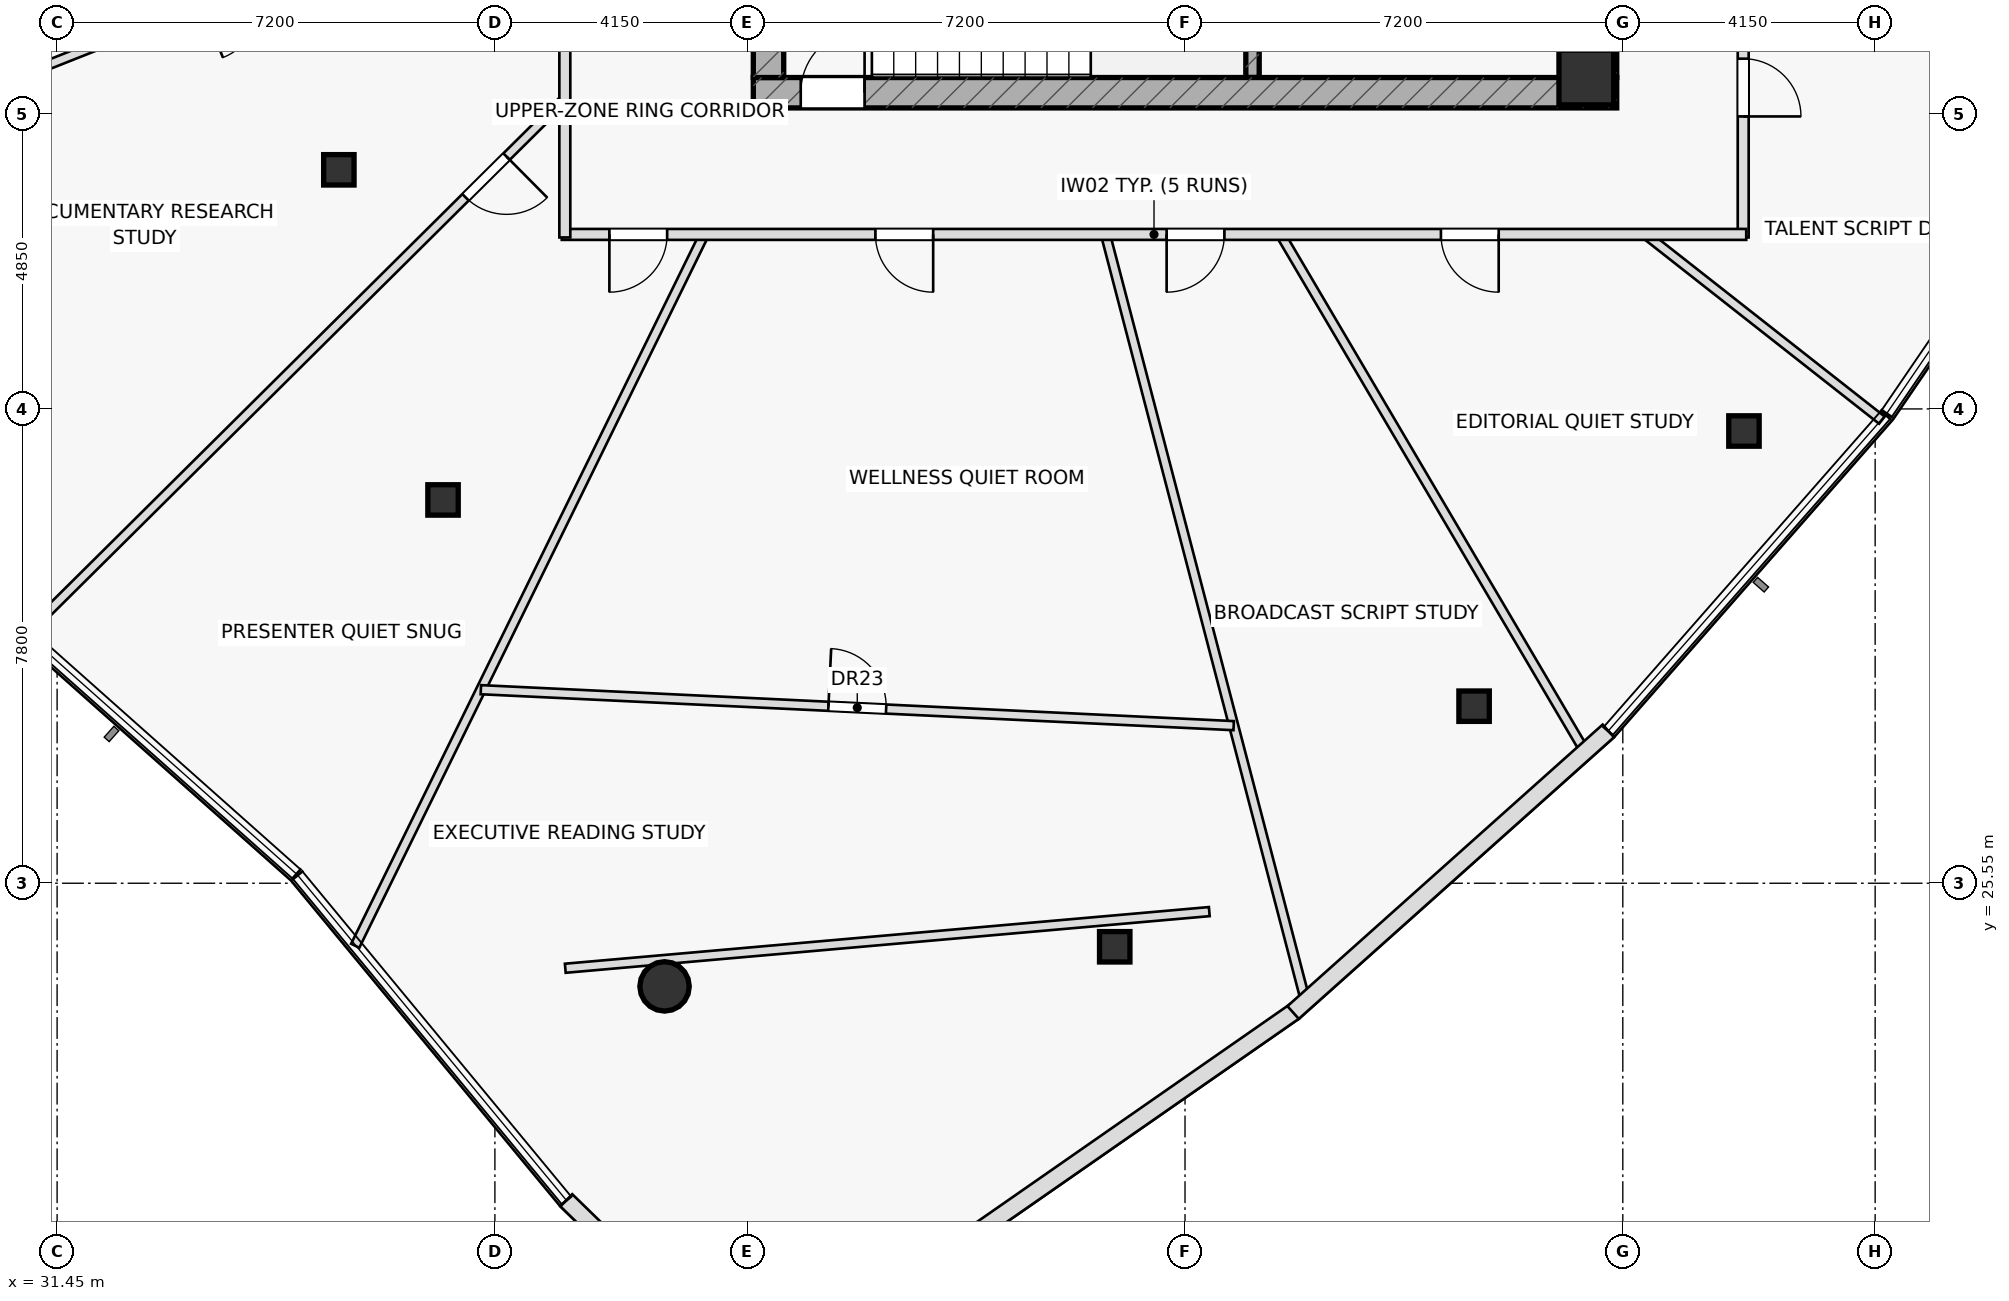
"""IFC4 building model, lengths in metres.
Left out: names, types, materials, properties, quantities, classifications, styles, units other than length and angle.
Written with IfcOpenShell. Run it as: python <this file> out.ifc"""

import sys

from ifc_helpers import new_model, si_unit, direction, frame, frame_2d, origin, origin_2d, place, context, subcontext, project, spatial, rectangle, hollow_rectangle, hollow_circle, extrude, element, fill, save


model = new_model("IFC4")
c1 = context("Model", 3, precision=1e-05, world=origin(), true_north=direction((0.0, 1.0)))
c2 = subcontext(c1, "Body", "Model", "MODEL_VIEW")
j1 = project(units=[si_unit("LENGTHUNIT", "METRE"), si_unit("PLANEANGLEUNIT", "RADIAN")], contexts=[c1])
p1 = place(None, origin())
s1 = spatial("IfcSite", under=j1, at=p1, CompositionType="ELEMENT")
p2 = place(p1, origin())
s2 = spatial("IfcBuilding", under=s1, at=p2, CompositionType="ELEMENT")
p3 = place(p2, frame((0.0, 0.0, 261.65)))
s3 = spatial("IfcBuildingStorey", under=s2, at=p3, CompositionType="ELEMENT", Elevation=261.65)
p4 = place(p3, frame((51.11, 38.8, 0.0), z_axis=(0.0, 0.0, 1.0), x_axis=(0.0, 1.0, 0.0)))
e1 = element("IfcWall", 1, at=p4, inside=s3, PredefinedType="SHEAR", context=c2, shape_type="SweptSolid", body=[
    extrude(rectangle(XDim=3.1, YDim=0.22, at=frame_2d((1.55, 0.0))), origin(), (0.0, 0.0, 1.0), 3.65),
])
p5 = place(p3, frame((42.9, 38.55, 0.0), z_axis=(0.0, 0.0, 1.0), x_axis=(1.0, 0.0, 0.0)))
e2 = element("IfcWall", 2, at=p5, inside=s3, PredefinedType="SHEAR", context=c2, shape_type="SweptSolid", body=[
    extrude(rectangle(XDim=14.2, YDim=0.5, at=frame_2d((7.1, 0.0))), origin(), (0.0, 0.0, 1.0), 3.65),
])
p6 = place(p5, frame((0.78, 0.0, 0.0)))
e3 = element("IfcOpeningElement", 3, at=p6, cuts=e2, PredefinedType="OPENING", context=c2, shape_type="SweptSolid", body=[
    extrude(rectangle(XDim=1.05, YDim=2.2, at=frame_2d((0.525, 1.1))), frame((0.0, 0.26, 0.0), z_axis=(0.0, -1.0, 0.0), x_axis=(1.0, 0.0, 0.0)), (0.0, 0.0, 1.0), 0.52),
])
p7 = place(p3, frame((43.15, 38.8, 0.0), z_axis=(0.0, 0.0, 1.0), x_axis=(0.0, 1.0, 0.0)))
e4 = element("IfcWall", 4, at=p7, inside=s3, PredefinedType="SHEAR", context=c2, shape_type="SweptSolid", body=[
    extrude(rectangle(XDim=12.4, YDim=0.5, at=frame_2d((6.2, 0.0))), origin(), (0.0, 0.0, 1.0), 3.65),
])
p8 = place(p3, frame((56.85, 38.8, 0.0), z_axis=(0.0, 0.0, 1.0), x_axis=(0.0, 1.0, 0.0)))
e5 = element("IfcWall", 5, at=p8, inside=s3, PredefinedType="SHEAR", context=c2, shape_type="SweptSolid", body=[
    extrude(rectangle(XDim=12.4, YDim=0.5, at=frame_2d((6.2, 0.0))), origin(), (0.0, 0.0, 1.0), 3.65),
])
p9 = place(p8, frame((3.85, 0.0, 0.0)))
e6 = element("IfcOpeningElement", 6, at=p9, cuts=e5, PredefinedType="OPENING", context=c2, shape_type="SweptSolid", body=[
    extrude(rectangle(XDim=1.5, YDim=2.2, at=frame_2d((0.75, 1.1))), frame((0.0, 0.26, 0.0), z_axis=(0.0, -1.0, 0.0), x_axis=(1.0, 0.0, 0.0)), (0.0, 0.0, 1.0), 0.52),
])
p10 = place(p3, frame((56.6, 38.8, 0.0), z_axis=(0.0, 0.0, 1.0), x_axis=(1.0, 0.0, 0.0)))
e7 = element("IfcColumn", 7, at=p10, inside=s3, PredefinedType="COLUMN", context=c2, shape_type="SweptSolid", body=[
    extrude(rectangle(XDim=0.9, YDim=0.9, at=origin_2d()), origin(), (0.0, 0.0, 1.0), 3.65),
])
for number, where, z_axis, x_axis in (
    (8, (36.083, 37.282, 0.0), (0.0, 0.0, 1.0), (1.0, 0.0, 0.0)),
    (9, (37.797, 31.853, 0.0), (0.0, 0.0, 1.0), (1.0, 0.0, 0.0)),
):
    element("IfcColumn", number, at=place(p3, frame(where, z_axis=z_axis, x_axis=x_axis)), inside=s3, PredefinedType="COLUMN", context=c2, shape_type="SweptSolid", body=[
        extrude(hollow_rectangle(XDim=0.5, YDim=0.5, WallThickness=0.03, at=origin_2d()), origin(), (0.0, 0.0, 1.0), 3.65),
    ])
p11 = place(p3, frame((41.44, 23.854, 0.0), z_axis=(0.0, 0.0, 1.0), x_axis=(1.0, 0.0, 0.0)))
e10 = element("IfcColumn", 10, at=p11, inside=s3, PredefinedType="COLUMN", context=c2, shape_type="SweptSolid", body=[
    extrude(hollow_circle(Radius=0.406, WallThickness=0.036, at=origin_2d()), origin(), (0.0, 0.0, 1.0), 3.65),
])
for number, where, z_axis, x_axis in (
    (11, (48.844, 24.505, 0.0), (0.0, 0.0, 1.0), (1.0, 0.0, 0.0)),
    (12, (54.754, 28.462, 0.0), (0.0, 0.0, 1.0), (1.0, 0.0, 0.0)),
    (13, (59.192, 32.987, 0.0), (0.0, 0.0, 1.0), (1.0, 0.0, 0.0)),
):
    element("IfcColumn", number, at=place(p3, frame(where, z_axis=z_axis, x_axis=x_axis)), inside=s3, PredefinedType="COLUMN", context=c2, shape_type="SweptSolid", body=[
        extrude(hollow_rectangle(XDim=0.5, YDim=0.5, WallThickness=0.03, at=origin_2d()), origin(), (0.0, 0.0, 1.0), 3.65),
    ])
p12 = place(p3, frame((39.808, 24.152, 0.0), z_axis=(0.0, 0.0, 1.0), x_axis=(0.996153584085, 0.087624408208, 0.0)))
e14 = element("IfcWall", 14, at=p12, inside=s3, PredefinedType="PARTITIONING", context=c2, shape_type="SweptSolid", body=[
    extrude(rectangle(XDim=10.632, YDim=0.15, at=frame_2d((5.316, 0.0))), origin(), (0.0, 0.0, 1.0), 3.175),
])
p13 = place(p3, frame((37.08, 41.302, 0.0), z_axis=(0.0, 0.0, 1.0), x_axis=(-0.929496393642, -0.368831200154, 0.0)))
e15 = element("IfcWall", 15, at=p13, inside=s3, PredefinedType="PARTITIONING", context=c2, shape_type="SweptSolid", body=[
    extrude(rectangle(XDim=11.222, YDim=0.15, at=frame_2d((5.611, 0.0))), origin(), (0.0, 0.0, 1.0), 3.075),
])
p14 = place(p13, frame((2.55, 0.0, 0.0)))
e16 = element("IfcOpeningElement", 16, at=p14, cuts=e15, PredefinedType="OPENING", context=c2, shape_type="SweptSolid", body=[
    extrude(rectangle(XDim=0.95, YDim=2.05, at=frame_2d((0.475, 1.025))), frame((0.0, 0.085, 0.0), z_axis=(0.0, -1.0, 0.0), x_axis=(1.0, 0.0, 0.0)), (0.0, 0.0, 1.0), 0.17),
])
p15 = place(p3, frame((39.8, 38.45, 0.0), z_axis=(0.0, 0.0, 1.0), x_axis=(-0.709807958625, -0.704395245493, 0.0)))
e17 = element("IfcWall", 17, at=p15, inside=s3, PredefinedType="PARTITIONING", context=c2, shape_type="SweptSolid", body=[
    extrude(rectangle(XDim=12.494, YDim=0.15, at=frame_2d((6.247, 0.0))), origin(), (0.0, 0.0, 1.0), 3.075),
])
p16 = place(p15, frame((1.35, 0.0, 0.0)))
e18 = element("IfcOpeningElement", 18, at=p16, cuts=e17, PredefinedType="OPENING", context=c2, shape_type="SweptSolid", body=[
    extrude(rectangle(XDim=0.95, YDim=2.05, at=frame_2d((0.475, 1.025))), frame((0.0, 0.085, 0.0), z_axis=(0.0, -1.0, 0.0), x_axis=(1.0, 0.0, 0.0)), (0.0, 0.0, 1.0), 0.17),
])
p17 = place(p3, frame((42.092, 36.22, 0.0), z_axis=(0.0, 0.0, 1.0), x_axis=(-0.440463459743, -0.897770538964, 0.0)))
e19 = element("IfcWall", 19, at=p17, inside=s3, PredefinedType="PARTITIONING", context=c2, shape_type="SweptSolid", body=[
    extrude(rectangle(XDim=13.031, YDim=0.15, at=frame_2d((6.515, 0.0))), origin(), (0.0, 0.0, 1.0), 3.175),
])
p18 = place(p3, frame((48.692, 36.22, 0.0), z_axis=(0.0, 0.0, 1.0), x_axis=(0.252549118901, -0.96758407518, 0.0)))
e20 = element("IfcWall", 20, at=p18, inside=s3, PredefinedType="PARTITIONING", context=c2, shape_type="SweptSolid", body=[
    extrude(rectangle(XDim=13.046, YDim=0.15, at=frame_2d((6.523, 0.0))), origin(), (0.0, 0.0, 1.0), 3.175),
])
p19 = place(p3, frame((51.571, 36.22, 0.0), z_axis=(0.0, 0.0, 1.0), x_axis=(0.507444392482, -0.861684506382, 0.0)))
e21 = element("IfcWall", 21, at=p19, inside=s3, PredefinedType="PARTITIONING", context=c2, shape_type="SweptSolid", body=[
    extrude(rectangle(XDim=9.882, YDim=0.15, at=frame_2d((4.941, 0.0))), origin(), (0.0, 0.0, 1.0), 3.075),
])
p20 = place(p3, frame((57.574, 36.22, 0.0), z_axis=(0.0, 0.0, 1.0), x_axis=(0.78630805537, -0.617834639738, 0.0)))
e22 = element("IfcWall", 22, at=p20, inside=s3, PredefinedType="PARTITIONING", context=c2, shape_type="SweptSolid", body=[
    extrude(rectangle(XDim=4.943, YDim=0.15, at=frame_2d((2.472, 0.0))), origin(), (0.0, 0.0, 1.0), 3.075),
])
p21 = place(p3, frame((38.419, 28.733, 0.0), z_axis=(0.0, 0.0, 1.0), x_axis=(0.998860594399, -0.047723295741, 0.0)))
e23 = element("IfcWall", 23, at=p21, inside=s3, PredefinedType="PARTITIONING", context=c2, shape_type="SweptSolid", body=[
    extrude(rectangle(XDim=12.396, YDim=0.15, at=frame_2d((6.198, 0.0))), origin(), (0.0, 0.0, 1.0), 3.175),
])
p22 = place(p21, frame((5.723, 0.0, 0.0)))
e24 = element("IfcOpeningElement", 24, at=p22, cuts=e23, PredefinedType="OPENING", context=c2, shape_type="SweptSolid", body=[
    extrude(rectangle(XDim=0.95, YDim=2.05, at=frame_2d((0.475, 1.025))), frame((0.0, 0.085, 0.0), z_axis=(0.0, -1.0, 0.0), x_axis=(1.0, 0.0, 0.0)), (0.0, 0.0, 1.0), 0.17),
])
p23 = place(p3, frame((59.18, 41.1, 0.0), z_axis=(0.0, 0.0, 1.0), x_axis=(0.0, -1.0, 0.0)))
e25 = element("IfcWall", 25, at=p23, inside=s3, PredefinedType="PARTITIONING", context=c2, shape_type="SweptSolid", body=[
    extrude(rectangle(XDim=4.93, YDim=0.18, at=frame_2d((2.465, 0.0))), origin(), (0.0, 0.0, 1.0), 3.355),
])
p24 = place(p23, frame((1.99, 0.0, 0.0)))
e26 = element("IfcOpeningElement", 26, at=p24, cuts=e25, PredefinedType="OPENING", context=c2, shape_type="SweptSolid", body=[
    extrude(rectangle(XDim=0.95, YDim=2.05, at=frame_2d((0.475, 1.025))), frame((0.0, 0.1, 0.0), z_axis=(0.0, -1.0, 0.0), x_axis=(1.0, 0.0, 0.0)), (0.0, 0.0, 1.0), 0.2),
])
p25 = place(p3, frame((59.23, 36.22, 0.0), z_axis=(0.0, 0.0, 1.0), x_axis=(-1.0, 0.0, 0.0)))
e27 = element("IfcWall", 27, at=p25, inside=s3, PredefinedType="PARTITIONING", context=c2, shape_type="SweptSolid", body=[
    extrude(rectangle(XDim=19.48, YDim=0.18, at=frame_2d((9.74, 0.0))), origin(), (0.0, 0.0, 1.0), 3.075),
])
p26 = place(p25, frame((4.071, 0.0, 0.0)))
e28 = element("IfcOpeningElement", 28, at=p26, cuts=e27, PredefinedType="OPENING", context=c2, shape_type="SweptSolid", body=[
    extrude(rectangle(XDim=0.95, YDim=2.05, at=frame_2d((0.475, 1.025))), frame((0.0, 0.1, 0.0), z_axis=(0.0, -1.0, 0.0), x_axis=(1.0, 0.0, 0.0)), (0.0, 0.0, 1.0), 0.2),
])
p27 = place(p25, frame((8.583, 0.0, 0.0)))
e29 = element("IfcOpeningElement", 29, at=p27, cuts=e27, PredefinedType="OPENING", context=c2, shape_type="SweptSolid", body=[
    extrude(rectangle(XDim=0.95, YDim=2.05, at=frame_2d((0.475, 1.025))), frame((0.0, 0.1, 0.0), z_axis=(0.0, -1.0, 0.0), x_axis=(1.0, 0.0, 0.0)), (0.0, 0.0, 1.0), 0.2),
])
p28 = place(p25, frame((13.372, 0.0, 0.0)))
e30 = element("IfcOpeningElement", 30, at=p28, cuts=e27, PredefinedType="OPENING", context=c2, shape_type="SweptSolid", body=[
    extrude(rectangle(XDim=0.95, YDim=2.05, at=frame_2d((0.475, 1.025))), frame((0.0, 0.1, 0.0), z_axis=(0.0, -1.0, 0.0), x_axis=(1.0, 0.0, 0.0)), (0.0, 0.0, 1.0), 0.2),
])
p29 = place(p25, frame((17.747, 0.0, 0.0)))
e31 = element("IfcOpeningElement", 31, at=p29, cuts=e27, PredefinedType="OPENING", context=c2, shape_type="SweptSolid", body=[
    extrude(rectangle(XDim=0.95, YDim=2.05, at=frame_2d((0.475, 1.025))), frame((0.0, 0.1, 0.0), z_axis=(0.0, -1.0, 0.0), x_axis=(1.0, 0.0, 0.0)), (0.0, 0.0, 1.0), 0.2),
])
p30 = place(p3, frame((39.8, 36.17, 0.0), z_axis=(0.0, 0.0, 1.0), x_axis=(0.0, 1.0, 0.0)))
e32 = element("IfcWall", 32, at=p30, inside=s3, PredefinedType="PARTITIONING", context=c2, shape_type="SweptSolid", body=[
    extrude(rectangle(XDim=4.08, YDim=0.18, at=frame_2d((2.04, 0.0))), origin(), (0.0, 0.0, 1.0), 3.355),
])
p31 = place(p3, frame((39.824, 20.336, 0.0), z_axis=(0.0, 0.0, 1.0), x_axis=(0.716300574628, -0.697791864948, 0.0)))
e33 = element("IfcWall", 33, at=p31, inside=s3, PredefinedType="STANDARD", context=c2, shape_type="SweptSolid", body=[
    extrude(rectangle(XDim=1.807, YDim=0.28, at=frame_2d((0.904, 0.0))), origin(), (0.0, 0.0, 1.0), 3.65),
])
p32 = place(p3, frame((46.085, 19.466, 0.0), z_axis=(0.0, 0.0, 1.0), x_axis=(0.820921637753, 0.57104086077, 0.0)))
e34 = element("IfcWall", 34, at=p32, inside=s3, PredefinedType="STANDARD", context=c2, shape_type="SweptSolid", body=[
    extrude(rectangle(XDim=6.963, YDim=0.28, at=frame_2d((3.482, 0.0))), origin(), (0.0, 0.0, 1.0), 3.65),
])
p33 = place(p3, frame((51.778, 23.424, 0.0), z_axis=(0.0, 0.0, 1.0), x_axis=(0.745794941976, 0.666175580852, 0.0)))
e35 = element("IfcWall", 35, at=p33, inside=s3, PredefinedType="STANDARD", context=c2, shape_type="SweptSolid", body=[
    extrude(rectangle(XDim=6.951, YDim=0.28, at=frame_2d((3.476, 0.0))), origin(), (0.0, 0.0, 1.0), 3.65),
])
p34 = place(p6, origin())
e36 = element("IfcDoor", 36, at=p34, inside=s3, OperationType="SINGLE_SWING_RIGHT", PredefinedType="DOOR", context=c2, shape_type="SweptSolid", body=[
    extrude(rectangle(XDim=1.05, YDim=2.2, at=frame_2d((0.525, 1.1))), frame((0.0, 0.025, 0.0), z_axis=(0.0, -1.0, 0.0), x_axis=(1.0, 0.0, 0.0)), (0.0, 0.0, 1.0), 0.05),
])
fill(e3, e36)
p35 = place(p16, origin())
e37 = element("IfcDoor", 37, at=p35, inside=s3, OperationType="SINGLE_SWING_LEFT", PredefinedType="DOOR", context=c2, shape_type="SweptSolid", body=[
    extrude(rectangle(XDim=0.95, YDim=2.05, at=frame_2d((0.475, 1.025))), frame((0.0, 0.025, 0.0), z_axis=(0.0, -1.0, 0.0), x_axis=(1.0, 0.0, 0.0)), (0.0, 0.0, 1.0), 0.05),
])
fill(e18, e37)
p36 = place(p22, origin())
e38 = element("IfcDoor", 38, at=p36, inside=s3, OperationType="SINGLE_SWING_LEFT", PredefinedType="DOOR", context=c2, shape_type="SweptSolid", body=[
    extrude(rectangle(XDim=0.95, YDim=2.05, at=frame_2d((0.475, 1.025))), frame((0.0, 0.025, 0.0), z_axis=(0.0, -1.0, 0.0), x_axis=(1.0, 0.0, 0.0)), (0.0, 0.0, 1.0), 0.05),
])
fill(e24, e38)
p37 = place(p24, origin())
e39 = element("IfcDoor", 39, at=p37, inside=s3, OperationType="SINGLE_SWING_RIGHT", PredefinedType="DOOR", context=c2, shape_type="SweptSolid", body=[
    extrude(rectangle(XDim=0.95, YDim=2.05, at=frame_2d((0.475, 1.025))), frame((0.0, 0.025, 0.0), z_axis=(0.0, -1.0, 0.0), x_axis=(1.0, 0.0, 0.0)), (0.0, 0.0, 1.0), 0.05),
])
fill(e26, e39)
p38 = place(p26, origin())
e40 = element("IfcDoor", 40, at=p38, inside=s3, OperationType="SINGLE_SWING_LEFT", PredefinedType="DOOR", context=c2, shape_type="SweptSolid", body=[
    extrude(rectangle(XDim=0.95, YDim=2.05, at=frame_2d((0.475, 1.025))), frame((0.0, 0.025, 0.0), z_axis=(0.0, -1.0, 0.0), x_axis=(1.0, 0.0, 0.0)), (0.0, 0.0, 1.0), 0.05),
])
fill(e28, e40)
p39 = place(p27, origin())
e41 = element("IfcDoor", 41, at=p39, inside=s3, OperationType="SINGLE_SWING_RIGHT", PredefinedType="DOOR", context=c2, shape_type="SweptSolid", body=[
    extrude(rectangle(XDim=0.95, YDim=2.05, at=frame_2d((0.475, 1.025))), frame((0.0, 0.025, 0.0), z_axis=(0.0, -1.0, 0.0), x_axis=(1.0, 0.0, 0.0)), (0.0, 0.0, 1.0), 0.05),
])
fill(e29, e41)
p40 = place(p28, origin())
e42 = element("IfcDoor", 42, at=p40, inside=s3, OperationType="SINGLE_SWING_LEFT", PredefinedType="DOOR", context=c2, shape_type="SweptSolid", body=[
    extrude(rectangle(XDim=0.95, YDim=2.05, at=frame_2d((0.475, 1.025))), frame((0.0, 0.025, 0.0), z_axis=(0.0, -1.0, 0.0), x_axis=(1.0, 0.0, 0.0)), (0.0, 0.0, 1.0), 0.05),
])
fill(e30, e42)
p41 = place(p29, origin())
e43 = element("IfcDoor", 43, at=p41, inside=s3, OperationType="SINGLE_SWING_RIGHT", PredefinedType="DOOR", context=c2, shape_type="SweptSolid", body=[
    extrude(rectangle(XDim=0.95, YDim=2.05, at=frame_2d((0.475, 1.025))), frame((0.0, 0.025, 0.0), z_axis=(0.0, -1.0, 0.0), x_axis=(1.0, 0.0, 0.0)), (0.0, 0.0, 1.0), 0.05),
])
fill(e31, e43)
save(model, sys.argv[1])
